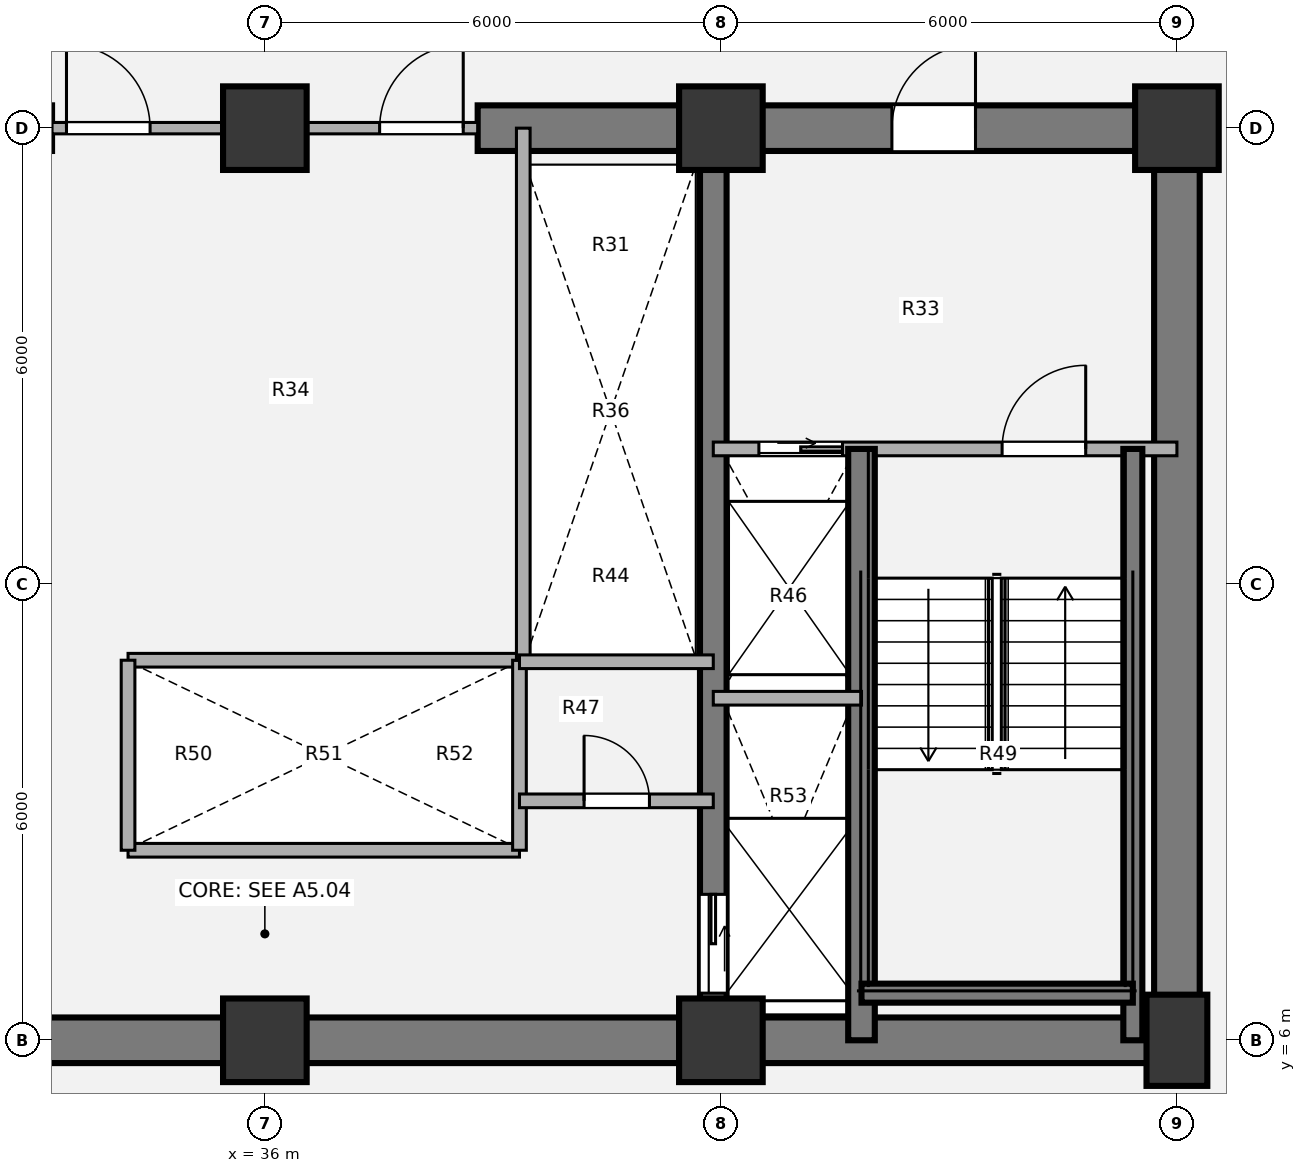
"""IFC4 building model, lengths in metres.
Left out: names, types, materials, properties, quantities, classifications, styles, units other than length and angle.
Written with IfcOpenShell. Run it as: python <this file> out.ifc"""

import sys

from ifc_helpers import new_model, si_unit, direction, frame, frame_2d, origin, origin_2d, place, context, subcontext, project, spatial, rectangle, extrude, source, transform, mapped, element, fill, save


model = new_model("IFC4")
c1 = context("Model", 3, precision=1e-05, world=origin(), true_north=direction((0.0, 1.0)))
c2 = subcontext(c1, "Body", "Model", "MODEL_VIEW")
j1 = project(units=[si_unit("LENGTHUNIT", "METRE"), si_unit("PLANEANGLEUNIT", "RADIAN")], contexts=[c1])
p1 = place(None, origin())
s1 = spatial("IfcSite", under=j1, at=p1, CompositionType="ELEMENT")
p2 = place(p1, origin())
s2 = spatial("IfcBuilding", under=s1, at=p2, CompositionType="ELEMENT")
p3 = place(p2, frame((0.0, 0.0, 64.8)))
s3 = spatial("IfcBuildingStorey", under=s2, at=p3, CompositionType="ELEMENT", Elevation=64.8)
m1 = source(origin(), c2, "Body", "SweptSolid", [
    extrude(rectangle(XDim=1.1, YDim=1.1, at=origin_2d()), origin(), (0.0, 0.0, 1.0), 3.78),
])
for number, where, z_axis, x_axis in (
    (1, (36.0, 6.0, 0.0), (0.0, 0.0, 1.0), (1.0, 0.0, 0.0)),
    (2, (42.0, 6.0, 0.0), (0.0, 0.0, 1.0), (1.0, 0.0, 0.0)),
):
    element("IfcColumn", number, at=place(p3, frame(where, z_axis=z_axis, x_axis=x_axis)), inside=s3, PredefinedType="COLUMN", context=c2, shape_type="MappedRepresentation", body=[
        mapped(m1, transform((0.0, 0.0, 0.0), x_axis=(1.0, 0.0, 0.0), y_axis=(0.0, 1.0, 0.0), z_axis=(0.0, 0.0, 1.0), scale=1.0)),
    ])
m2 = source(origin(), c2, "Body", "SweptSolid", [
    extrude(rectangle(XDim=0.8, YDim=1.2, at=origin_2d()), origin(), (0.0, 0.0, 1.0), 3.78),
])
p4 = place(p3, frame((48.0, 6.0, 0.0), z_axis=(0.0, 0.0, 1.0), x_axis=(1.0, 0.0, 0.0)))
e3 = element("IfcColumn", 3, at=p4, inside=s3, PredefinedType="COLUMN", context=c2, shape_type="MappedRepresentation", body=[
    mapped(m2, transform((0.0, 0.0, 0.0), x_axis=(1.0, 0.0, 0.0), y_axis=(0.0, 1.0, 0.0), z_axis=(0.0, 0.0, 1.0), scale=1.0)),
])
for number, where, z_axis, x_axis in (
    (4, (36.0, 18.0, 0.0), (0.0, 0.0, 1.0), (1.0, 0.0, 0.0)),
    (5, (42.0, 18.0, 0.0), (0.0, 0.0, 1.0), (1.0, 0.0, 0.0)),
    (6, (48.0, 18.0, 0.0), (0.0, 0.0, 1.0), (1.0, 0.0, 0.0)),
):
    element("IfcColumn", number, at=place(p3, frame(where, z_axis=z_axis, x_axis=x_axis)), inside=s3, PredefinedType="COLUMN", context=c2, shape_type="MappedRepresentation", body=[
        mapped(m1, transform((0.0, 0.0, 0.0), x_axis=(1.0, 0.0, 0.0), y_axis=(0.0, 1.0, 0.0), z_axis=(0.0, 0.0, 1.0), scale=1.0)),
    ])
p5 = place(p3, frame((48.3, 6.0, 0.0), z_axis=(0.0, 0.0, 1.0), x_axis=(-1.0, 0.0, 0.0)))
e7 = element("IfcWall", 7, at=p5, inside=s3, PredefinedType="SHEAR", context=c2, shape_type="SweptSolid", body=[
    extrude(rectangle(XDim=24.6, YDim=0.6, at=frame_2d((12.3, 0.0))), origin(), (0.0, 0.0, 1.0), 3.78),
])
p6 = place(p3, frame((48.0, 18.0, 0.0), z_axis=(0.0, 0.0, 1.0), x_axis=(0.0, -1.0, 0.0)))
e8 = element("IfcWall", 8, at=p6, inside=s3, PredefinedType="SHEAR", context=c2, shape_type="SweptSolid", body=[
    extrude(rectangle(XDim=12.0, YDim=0.6, at=frame_2d((6.0, 0.0))), origin(), (0.0, 0.0, 1.0), 3.78),
])
p7 = place(p3, frame((38.8, 18.0, 0.0), z_axis=(0.0, 0.0, 1.0), x_axis=(1.0, 0.0, 0.0)))
e9 = element("IfcWall", 9, at=p7, inside=s3, PredefinedType="SHEAR", context=c2, shape_type="SweptSolid", body=[
    extrude(rectangle(XDim=9.5, YDim=0.6, at=frame_2d((4.75, 0.0))), origin(), (0.0, 0.0, 1.0), 3.78),
])
p8 = place(p7, frame((5.45, 0.0, 0.0)))
e10 = element("IfcOpeningElement", 10, at=p8, cuts=e9, PredefinedType="OPENING", context=c2, shape_type="SweptSolid", body=[
    extrude(rectangle(XDim=1.1, YDim=2.1, at=origin_2d()), frame((0.55, 0.31, 1.05), z_axis=(0.0, -1.0, 0.0), x_axis=(1.0, 0.0, 0.0)), (0.0, 0.0, 1.0), 0.62),
])
p9 = place(p3, frame((41.9, 18.0, 0.0), z_axis=(0.0, 0.0, 1.0), x_axis=(0.0, -1.0, 0.0)))
e11 = element("IfcWall", 11, at=p9, inside=s3, PredefinedType="SHEAR", context=c2, shape_type="SweptSolid", body=[
    extrude(rectangle(XDim=12.0, YDim=0.35, at=frame_2d((6.0, 0.0))), origin(), (0.0, 0.0, 1.0), 3.78),
])
p10 = place(p9, frame((10.08, 0.0, 0.0)))
e12 = element("IfcOpeningElement", 12, at=p10, cuts=e11, PredefinedType="OPENING", context=c2, shape_type="SweptSolid", body=[
    extrude(rectangle(XDim=1.3, YDim=2.1, at=origin_2d()), frame((0.65, 0.185, 1.05), z_axis=(0.0, -1.0, 0.0), x_axis=(1.0, 0.0, 0.0)), (0.0, 0.0, 1.0), 0.37),
])
for number, where, z_axis, x_axis in (
    (13, (34.2, 11.0, 0.0), (0.0, 0.0, 1.0), (1.0, 0.0, 0.0)),
    (14, (34.2, 8.5, 0.0), (0.0, 0.0, 1.0), (1.0, 0.0, 0.0)),
):
    element("IfcWall", number, at=place(p3, frame(where, z_axis=z_axis, x_axis=x_axis)), inside=s3, PredefinedType="PARTITIONING", context=c2, shape_type="SweptSolid", body=[
        extrude(rectangle(XDim=5.15, YDim=0.18, at=frame_2d((2.575, 0.0))), origin(), (0.0, 0.0, 1.0), 3.5),
    ])
for number, where, z_axis, x_axis in (
    (15, (34.2, 8.5, 0.0), (0.0, 0.0, 1.0), (0.0, 1.0, 0.0)),
    (16, (39.35, 8.5, 0.0), (0.0, 0.0, 1.0), (0.0, 1.0, 0.0)),
):
    element("IfcWall", number, at=place(p3, frame(where, z_axis=z_axis, x_axis=x_axis)), inside=s3, PredefinedType="PARTITIONING", context=c2, shape_type="SweptSolid", body=[
        extrude(rectangle(XDim=2.5, YDim=0.18, at=frame_2d((1.25, 0.0))), origin(), (0.0, 0.0, 1.0), 3.5),
    ])
p11 = place(p3, frame((39.4, 11.0, 0.0), z_axis=(0.0, 0.0, 1.0), x_axis=(0.0, 1.0, 0.0)))
e17 = element("IfcWall", 17, at=p11, inside=s3, PredefinedType="PARTITIONING", context=c2, shape_type="SweptSolid", body=[
    extrude(rectangle(XDim=7.0, YDim=0.18, at=frame_2d((3.5, 0.0))), origin(), (0.0, 0.0, 1.0), 3.5),
])
p12 = place(p3, frame((39.35, 10.98, 0.0), z_axis=(0.0, 0.0, 1.0), x_axis=(1.0, 0.0, 0.0)))
e18 = element("IfcWall", 18, at=p12, inside=s3, PredefinedType="PARTITIONING", context=c2, shape_type="SweptSolid", body=[
    extrude(rectangle(XDim=2.55, YDim=0.18, at=frame_2d((1.275, 0.0))), origin(), (0.0, 0.0, 1.0), 3.5),
])
p13 = place(p3, frame((39.35, 9.15, 0.0), z_axis=(0.0, 0.0, 1.0), x_axis=(1.0, 0.0, 0.0)))
e19 = element("IfcWall", 19, at=p13, inside=s3, PredefinedType="PARTITIONING", context=c2, shape_type="SweptSolid", body=[
    extrude(rectangle(XDim=2.55, YDim=0.18, at=frame_2d((1.275, 0.0))), origin(), (0.0, 0.0, 1.0), 3.5),
])
p14 = place(p13, frame((0.85, 0.0, 0.0)))
e20 = element("IfcOpeningElement", 20, at=p14, cuts=e19, PredefinedType="OPENING", context=c2, shape_type="SweptSolid", body=[
    extrude(rectangle(XDim=0.86, YDim=2.1, at=origin_2d()), frame((0.43, 0.1, 1.05), z_axis=(0.0, -1.0, 0.0), x_axis=(1.0, 0.0, 0.0)), (0.0, 0.0, 1.0), 0.2),
])
p15 = place(p3, frame((33.2, 18.0, 0.0), z_axis=(0.0, 0.0, 1.0), x_axis=(1.0, 0.0, 0.0)))
e21 = element("IfcWall", 21, at=p15, inside=s3, PredefinedType="PARTITIONING", context=c2, shape_type="SweptSolid", body=[
    extrude(rectangle(XDim=5.6, YDim=0.15, at=frame_2d((2.8, 0.0))), origin(), (0.0, 0.0, 1.0), 2.315),
])
p16 = place(p15, frame((0.19, 0.0, 0.0)))
e22 = element("IfcOpeningElement", 22, at=p16, cuts=e21, PredefinedType="OPENING", context=c2, shape_type="SweptSolid", body=[
    extrude(rectangle(XDim=1.1, YDim=2.1, at=origin_2d()), frame((0.55, 0.085, 1.05), z_axis=(0.0, -1.0, 0.0), x_axis=(1.0, 0.0, 0.0)), (0.0, 0.0, 1.0), 0.17),
])
p17 = place(p15, frame((4.31, 0.0, 0.0)))
e23 = element("IfcOpeningElement", 23, at=p17, cuts=e21, PredefinedType="OPENING", context=c2, shape_type="SweptSolid", body=[
    extrude(rectangle(XDim=1.1, YDim=2.1, at=origin_2d()), frame((0.55, 0.085, 1.05), z_axis=(0.0, -1.0, 0.0), x_axis=(1.0, 0.0, 0.0)), (0.0, 0.0, 1.0), 0.17),
])
p18 = place(p3, frame((41.9, 13.78, 0.0), z_axis=(0.0, 0.0, 1.0), x_axis=(1.0, 0.0, 0.0)))
e24 = element("IfcWall", 24, at=p18, inside=s3, PredefinedType="PARTITIONING", context=c2, shape_type="SweptSolid", body=[
    extrude(rectangle(XDim=6.1, YDim=0.18, at=frame_2d((3.05, 0.0))), origin(), (0.0, 0.0, 1.0), 3.5),
])
p19 = place(p18, frame((0.6, 0.0, 0.0)))
e25 = element("IfcOpeningElement", 25, at=p19, cuts=e24, PredefinedType="OPENING", context=c2, shape_type="SweptSolid", body=[
    extrude(rectangle(XDim=1.1, YDim=2.1, at=origin_2d()), frame((0.55, 0.1, 1.05), z_axis=(0.0, -1.0, 0.0), x_axis=(1.0, 0.0, 0.0)), (0.0, 0.0, 1.0), 0.2),
])
p20 = place(p18, frame((3.8, 0.0, 0.0)))
e26 = element("IfcOpeningElement", 26, at=p20, cuts=e24, PredefinedType="OPENING", context=c2, shape_type="SweptSolid", body=[
    extrude(rectangle(XDim=1.1, YDim=2.1, at=origin_2d()), frame((0.55, 0.1, 1.05), z_axis=(0.0, -1.0, 0.0), x_axis=(1.0, 0.0, 0.0)), (0.0, 0.0, 1.0), 0.2),
])
p21 = place(p3, frame((43.85, 6.0, 0.0), z_axis=(0.0, 0.0, 1.0), x_axis=(0.0, 1.0, 0.0)))
e27 = element("IfcWall", 27, at=p21, inside=s3, PredefinedType="SHEAR", context=c2, shape_type="SweptSolid", body=[
    extrude(rectangle(XDim=7.78, YDim=0.35, at=frame_2d((3.89, 0.0))), origin(), (0.0, 0.0, 1.0), 3.85),
])
p22 = place(p3, frame((47.42, 6.0, 0.0), z_axis=(0.0, 0.0, 1.0), x_axis=(0.0, 1.0, 0.0)))
e28 = element("IfcWall", 28, at=p22, inside=s3, PredefinedType="SHEAR", context=c2, shape_type="SweptSolid", body=[
    extrude(rectangle(XDim=7.78, YDim=0.25, at=frame_2d((3.89, 0.0))), origin(), (0.0, 0.0, 1.0), 3.85),
])
p23 = place(p3, frame((43.85, 6.62, 0.0), z_axis=(0.0, 0.0, 1.0), x_axis=(1.0, 0.0, 0.0)))
e29 = element("IfcWall", 29, at=p23, inside=s3, PredefinedType="SHEAR", context=c2, shape_type="SweptSolid", body=[
    extrude(rectangle(XDim=3.57, YDim=0.25, at=frame_2d((1.785, 0.0))), origin(), (0.0, 0.0, 1.0), 3.85),
])
p24 = place(p3, frame((41.9, 10.5, 0.0), z_axis=(0.0, 0.0, 1.0), x_axis=(1.0, 0.0, 0.0)))
e30 = element("IfcWall", 30, at=p24, inside=s3, PredefinedType="PARTITIONING", context=c2, shape_type="SweptSolid", body=[
    extrude(rectangle(XDim=1.95, YDim=0.18, at=frame_2d((0.975, 0.0))), origin(), (0.0, 0.0, 1.0), 3.5),
])
m3 = source(origin(), c2, "Body", "SweptSolid", [
    extrude(rectangle(XDim=0.86, YDim=2.1, at=origin_2d()), frame((0.43, 0.025, 1.05), z_axis=(0.0, -1.0, 0.0), x_axis=(1.0, 0.0, 0.0)), (0.0, 0.0, 1.0), 0.05),
])
p25 = place(p14, origin())
e31 = element("IfcDoor", 31, at=p25, inside=s3, OperationType="SINGLE_SWING_LEFT", PredefinedType="DOOR", context=c2, shape_type="MappedRepresentation", body=[
    mapped(m3, transform((0.0, 0.0, 0.0), x_axis=(1.0, 0.0, 0.0), y_axis=(0.0, 1.0, 0.0), z_axis=(0.0, 0.0, 1.0), scale=1.0)),
])
fill(e20, e31)
m4 = source(origin(), c2, "Body", "SweptSolid", [
    extrude(rectangle(XDim=1.1, YDim=2.1, at=origin_2d()), frame((0.55, 0.025, 1.05), z_axis=(0.0, -1.0, 0.0), x_axis=(1.0, 0.0, 0.0)), (0.0, 0.0, 1.0), 0.05),
])
p26 = place(p16, origin())
e32 = element("IfcDoor", 32, at=p26, inside=s3, OperationType="SINGLE_SWING_LEFT", PredefinedType="DOOR", context=c2, shape_type="MappedRepresentation", body=[
    mapped(m4, transform((0.0, 0.0, 0.0), x_axis=(1.0, 0.0, 0.0), y_axis=(0.0, 1.0, 0.0), z_axis=(0.0, 0.0, 1.0), scale=1.0)),
])
fill(e22, e32)
p27 = place(p17, origin())
e33 = element("IfcDoor", 33, at=p27, inside=s3, OperationType="SINGLE_SWING_RIGHT", PredefinedType="DOOR", context=c2, shape_type="MappedRepresentation", body=[
    mapped(m4, transform((0.0, 0.0, 0.0), x_axis=(1.0, 0.0, 0.0), y_axis=(0.0, 1.0, 0.0), z_axis=(0.0, 0.0, 1.0), scale=1.0)),
])
fill(e23, e33)
m5 = source(origin(), c2, "Body", "SweptSolid", [
    extrude(rectangle(XDim=1.1, YDim=2.1, at=origin_2d()), frame((0.55, 0.025, 1.05), z_axis=(0.0, -1.0, 0.0), x_axis=(1.0, 0.0, 0.0)), (0.0, 0.0, 1.0), 0.05),
])
p28 = place(p19, origin())
e34 = element("IfcDoor", 34, at=p28, inside=s3, OperationType="SLIDING_TO_RIGHT", PredefinedType="DOOR", context=c2, shape_type="MappedRepresentation", body=[
    mapped(m5, transform((0.0, 0.0, 0.0), x_axis=(1.0, 0.0, 0.0), y_axis=(0.0, 1.0, 0.0), z_axis=(0.0, 0.0, 1.0), scale=1.0)),
])
fill(e25, e34)
m6 = source(origin(), c2, "Body", "SweptSolid", [
    extrude(rectangle(XDim=1.1, YDim=2.1, at=origin_2d()), frame((0.55, 0.025, 1.05), z_axis=(0.0, -1.0, 0.0), x_axis=(1.0, 0.0, 0.0)), (0.0, 0.0, 1.0), 0.05),
])
p29 = place(p20, origin())
e35 = element("IfcDoor", 35, at=p29, inside=s3, OperationType="SINGLE_SWING_RIGHT", PredefinedType="DOOR", context=c2, shape_type="MappedRepresentation", body=[
    mapped(m6, transform((0.0, 0.0, 0.0), x_axis=(1.0, 0.0, 0.0), y_axis=(0.0, 1.0, 0.0), z_axis=(0.0, 0.0, 1.0), scale=1.0)),
])
fill(e26, e35)
m7 = source(origin(), c2, "Body", "SweptSolid", [
    extrude(rectangle(XDim=1.3, YDim=2.1, at=origin_2d()), frame((0.65, 0.025, 1.05), z_axis=(0.0, -1.0, 0.0), x_axis=(1.0, 0.0, 0.0)), (0.0, 0.0, 1.0), 0.05),
])
p30 = place(p10, origin())
e36 = element("IfcDoor", 36, at=p30, inside=s3, OperationType="SLIDING_TO_LEFT", PredefinedType="DOOR", context=c2, shape_type="MappedRepresentation", body=[
    mapped(m7, transform((0.0, 0.0, 0.0), x_axis=(1.0, 0.0, 0.0), y_axis=(0.0, 1.0, 0.0), z_axis=(0.0, 0.0, 1.0), scale=1.0)),
])
fill(e12, e36)
p31 = place(p8, origin())
e37 = element("IfcDoor", 37, at=p31, inside=s3, OperationType="SINGLE_SWING_RIGHT", PredefinedType="DOOR", context=c2, shape_type="MappedRepresentation", body=[
    mapped(m4, transform((0.0, 0.0, 0.0), x_axis=(1.0, 0.0, 0.0), y_axis=(0.0, 1.0, 0.0), z_axis=(0.0, 0.0, 1.0), scale=1.0)),
])
fill(e10, e37)
save(model, sys.argv[1])
